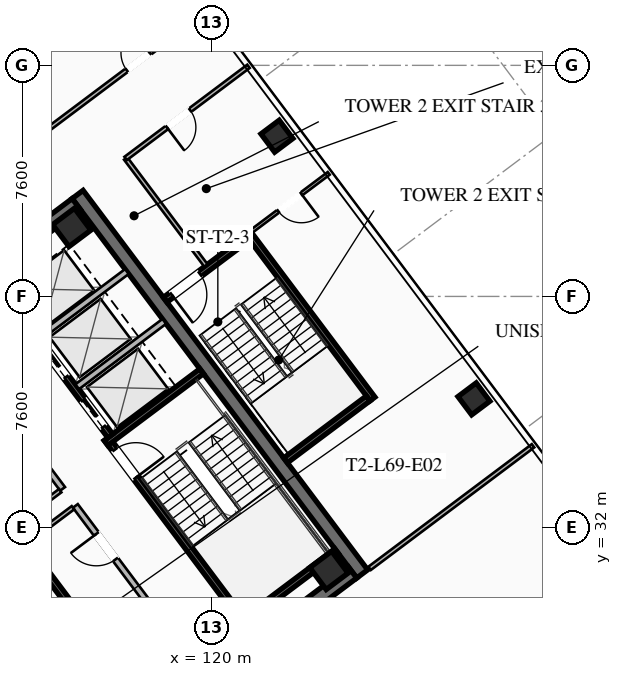
"""IFC4 building model, lengths in metres.
Left out: names, types, materials, properties, quantities, classifications, styles, units other than length and angle.
Written with IfcOpenShell. Run it as: python <this file> out.ifc"""

import sys

from ifc_helpers import new_model, si_unit, direction, frame, frame_2d, origin, origin_2d, place, context, subcontext, project, spatial, rectangle, hollow_rectangle, extrude, element, fill, save


model = new_model("IFC4")
c1 = context("Model", 3, precision=1e-05, world=origin(), true_north=direction((0.0, 1.0)))
c2 = subcontext(c1, "Body", "Model", "MODEL_VIEW")
j1 = project(units=[si_unit("LENGTHUNIT", "METRE"), si_unit("PLANEANGLEUNIT", "RADIAN")], contexts=[c1])
p1 = place(None, origin())
s1 = spatial("IfcSite", under=j1, at=p1, CompositionType="ELEMENT")
p2 = place(p1, origin())
s2 = spatial("IfcBuilding", under=s1, at=p2, CompositionType="ELEMENT")
p3 = place(p2, frame((0.0, 0.0, 255.4)))
s3 = spatial("IfcBuildingStorey", under=s2, at=p3, CompositionType="ELEMENT", Elevation=255.4)
p4 = place(p3, frame((115.604, 42.953, 0.0), z_axis=(0.0, 0.0, 1.0), x_axis=(0.600005007985, -0.799996243986, 0.0)))
e1 = element("IfcWall", 1, at=p4, inside=s3, PredefinedType="SHEAR", context=c2, shape_type="SweptSolid", body=[
    extrude(rectangle(XDim=15.6, YDim=0.45, at=frame_2d((7.8, 0.0))), origin(), (0.0, 0.0, 1.0), 4.0),
])
p5 = place(p3, frame((124.649, 30.518, 0.0), z_axis=(0.0, 0.0, 1.0), x_axis=(-0.8, -0.6, 0.0)))
e2 = element("IfcWall", 2, at=p5, inside=s3, PredefinedType="SHEAR", context=c2, shape_type="SweptSolid", body=[
    extrude(rectangle(XDim=15.26, YDim=0.45, at=frame_2d((7.63, 0.0))), origin(), (0.0, 0.0, 1.0), 4.0),
])
p6 = place(p5, frame((9.33, 0.0, 0.0)))
e3 = element("IfcOpeningElement", 3, at=p6, cuts=e2, PredefinedType="OPENING", context=c2, shape_type="SweptSolid", body=[
    extrude(rectangle(XDim=1.25, YDim=2.25, at=frame_2d((0.625, 1.125))), frame((0.0, 0.235, 0.0), z_axis=(0.0, -1.0, 0.0), x_axis=(1.0, 0.0, 0.0)), (0.0, 0.0, 1.0), 0.47),
])
p7 = place(p5, frame((4.28, 0.0, 0.0)))
e4 = element("IfcOpeningElement", 4, at=p7, cuts=e2, PredefinedType="OPENING", context=c2, shape_type="SweptSolid", body=[
    extrude(rectangle(XDim=1.25, YDim=2.25, at=frame_2d((0.625, 1.125))), frame((0.0, 0.235, 0.0), z_axis=(0.0, -1.0, 0.0), x_axis=(1.0, 0.0, 0.0)), (0.0, 0.0, 1.0), 0.47),
])
p8 = place(p3, frame((103.351, 33.482, 0.0), z_axis=(0.0, 0.0, 1.0), x_axis=(0.8, 0.6, 0.0)))
e5 = element("IfcWall", 5, at=p8, inside=s3, PredefinedType="SHEAR", context=c2, shape_type="SweptSolid", body=[
    extrude(rectangle(XDim=15.26, YDim=0.45, at=frame_2d((7.63, 0.0))), origin(), (0.0, 0.0, 1.0), 4.0),
])
p9 = place(p8, frame((4.68, 0.0, 0.0)))
e6 = element("IfcOpeningElement", 6, at=p9, cuts=e5, PredefinedType="OPENING", context=c2, shape_type="SweptSolid", body=[
    extrude(rectangle(XDim=1.25, YDim=2.25, at=frame_2d((0.625, 1.125))), frame((0.0, 0.235, 0.0), z_axis=(0.0, -1.0, 0.0), x_axis=(1.0, 0.0, 0.0)), (0.0, 0.0, 1.0), 0.47),
])
p10 = place(p8, frame((9.73, 0.0, 0.0)))
e7 = element("IfcOpeningElement", 7, at=p10, cuts=e5, PredefinedType="OPENING", context=c2, shape_type="SweptSolid", body=[
    extrude(rectangle(XDim=1.25, YDim=2.25, at=frame_2d((0.625, 1.125))), frame((0.0, 0.235, 0.0), z_axis=(0.0, -1.0, 0.0), x_axis=(1.0, 0.0, 0.0)), (0.0, 0.0, 1.0), 0.47),
])
for number, where, z_axis, x_axis in (
    (8, (123.87, 30.59, 0.0), (0.0, 0.0, 1.0), (0.8, 0.6, 0.0)),
    (9, (115.41, 41.87, 0.0), (0.0, 0.0, 1.0), (0.8, 0.6, 0.0)),
):
    element("IfcColumn", number, at=place(p3, frame(where, z_axis=z_axis, x_axis=x_axis)), inside=s3, PredefinedType="COLUMN", context=c2, shape_type="SweptSolid", body=[
        extrude(hollow_rectangle(XDim=0.9, YDim=0.9, WallThickness=0.04, at=origin_2d()), origin(), (0.0, 0.0, 1.0), 3.78),
    ])
for number, where, z_axis, x_axis in (
    (10, (128.64, 36.23, 0.0), (0.0, 0.0, 1.0), (0.8, 0.6, 0.0)),
    (11, (122.16, 44.87, 0.0), (0.0, 0.0, 1.0), (0.8, 0.6, 0.0)),
):
    element("IfcColumn", number, at=place(p3, frame(where, z_axis=z_axis, x_axis=x_axis)), inside=s3, PredefinedType="COLUMN", context=c2, shape_type="SweptSolid", body=[
        extrude(hollow_rectangle(XDim=0.75, YDim=0.75, WallThickness=0.032, at=origin_2d()), origin(), (0.0, 0.0, 1.0), 3.78),
    ])
p11 = place(p3, frame((116.56, 34.92, 0.0), z_axis=(0.0, 0.0, 1.0), x_axis=(0.59999041401, -0.800007189403, 0.0)))
e12 = element("IfcWall", 12, at=p11, inside=s3, PredefinedType="SHEAR", context=c2, shape_type="SweptSolid", body=[
    extrude(rectangle(XDim=8.15, YDim=0.2, at=frame_2d((4.075, 0.0))), origin(), (0.0, 0.0, 1.0), 3.78),
])
p12 = place(p11, frame((0.45, 0.0, 0.0)))
e13 = element("IfcOpeningElement", 13, at=p12, cuts=e12, PredefinedType="OPENING", context=c2, shape_type="SweptSolid", body=[
    extrude(rectangle(XDim=1.15, YDim=2.2, at=frame_2d((0.575, 1.1))), frame((0.0, 0.11, 0.0), z_axis=(0.0, -1.0, 0.0), x_axis=(1.0, 0.0, 0.0)), (0.0, 0.0, 1.0), 0.22),
])
for number, where, z_axis, x_axis in (
    (14, (116.54, 34.78, 0.0), (0.0, 0.0, 1.0), (0.8, 0.6, 0.0)),
    (15, (120.98, 28.86, 0.0), (0.0, 0.0, 1.0), (0.8, 0.6, 0.0)),
):
    element("IfcWall", number, at=place(p3, frame(where, z_axis=z_axis, x_axis=x_axis)), inside=s3, PredefinedType="SHEAR", context=c2, shape_type="SweptSolid", body=[
        extrude(rectangle(XDim=3.93, YDim=0.2, at=frame_2d((1.965, 0.0))), origin(), (0.0, 0.0, 1.0), 3.78),
    ])
p13 = place(p3, frame((118.058, 25.856, 0.0), z_axis=(0.0, 0.0, 1.0), x_axis=(-0.600002657301, 0.799998007018, 0.0)))
e16 = element("IfcWall", 16, at=p13, inside=s3, PredefinedType="SHEAR", context=c2, shape_type="SweptSolid", body=[
    extrude(rectangle(XDim=14.7, YDim=0.2, at=frame_2d((7.35, 0.0))), origin(), (0.0, 0.0, 1.0), 3.78),
])
p14 = place(p3, frame((112.75, 40.25, 0.0), z_axis=(0.0, 0.0, 1.0), x_axis=(0.599994036198, -0.800004472816, 0.0)))
e17 = element("IfcWall", 17, at=p14, inside=s3, PredefinedType="SHEAR", context=c2, shape_type="SweptSolid", body=[
    extrude(rectangle(XDim=6.55, YDim=0.2, at=frame_2d((3.275, 0.0))), origin(), (0.0, 0.0, 1.0), 3.78),
])
p15 = place(p14, frame((5.075, 0.0, 0.0)))
e18 = element("IfcOpeningElement", 18, at=p15, cuts=e17, PredefinedType="OPENING", context=c2, shape_type="SweptSolid", body=[
    extrude(rectangle(XDim=1.1, YDim=2.2, at=frame_2d((0.55, 1.1))), frame((0.0, 0.11, 0.0), z_axis=(0.0, -1.0, 0.0), x_axis=(1.0, 0.0, 0.0)), (0.0, 0.0, 1.0), 0.22),
])
p16 = place(p14, frame((3.025, 0.0, 0.0)))
e19 = element("IfcOpeningElement", 19, at=p16, cuts=e17, PredefinedType="OPENING", context=c2, shape_type="SweptSolid", body=[
    extrude(rectangle(XDim=1.1, YDim=2.2, at=frame_2d((0.55, 1.1))), frame((0.0, 0.11, 0.0), z_axis=(0.0, -1.0, 0.0), x_axis=(1.0, 0.0, 0.0)), (0.0, 0.0, 1.0), 0.22),
])
p17 = place(p14, frame((1.025, 0.0, 0.0)))
e20 = element("IfcOpeningElement", 20, at=p17, cuts=e17, PredefinedType="OPENING", context=c2, shape_type="SweptSolid", body=[
    extrude(rectangle(XDim=1.1, YDim=2.2, at=frame_2d((0.55, 1.1))), frame((0.0, 0.11, 0.0), z_axis=(0.0, -1.0, 0.0), x_axis=(1.0, 0.0, 0.0)), (0.0, 0.0, 1.0), 0.22),
])
for number, where, z_axis, x_axis in (
    (21, (115.59, 36.63, 0.0), (0.0, 0.0, 1.0), (0.8, 0.6, 0.0)),
    (22, (114.36, 38.27, 0.0), (0.0, 0.0, 1.0), (0.8, 0.6, 0.0)),
):
    element("IfcWall", number, at=place(p3, frame(where, z_axis=z_axis, x_axis=x_axis)), inside=s3, PredefinedType="SOLIDWALL", context=c2, shape_type="SweptSolid", body=[
        extrude(rectangle(XDim=3.58, YDim=0.2, at=frame_2d((1.79, 0.0))), origin(), (0.0, 0.0, 1.0), 3.78),
    ])
p18 = place(p3, frame((119.73, 27.11, 0.0), z_axis=(0.0, 0.0, 1.0), x_axis=(-0.600005580459, 0.799995814625, 0.0)))
e23 = element("IfcWall", 23, at=p18, inside=s3, PredefinedType="SOLIDWALL", context=c2, shape_type="SweptSolid", body=[
    extrude(rectangle(XDim=7.0, YDim=0.2, at=frame_2d((3.5, 0.0))), origin(), (0.0, 0.0, 1.0), 2.971),
])
p19 = place(p18, frame((0.85, 0.0, 0.0)))
e24 = element("IfcOpeningElement", 24, at=p19, cuts=e23, PredefinedType="OPENING", context=c2, shape_type="SweptSolid", body=[
    extrude(rectangle(XDim=0.95, YDim=2.05, at=frame_2d((0.475, 1.025))), frame((0.0, 0.11, 0.0), z_axis=(0.0, -1.0, 0.0), x_axis=(1.0, 0.0, 0.0)), (0.0, 0.0, 1.0), 0.22),
])
p20 = place(p18, frame((4.8, 0.0, 0.0)))
e25 = element("IfcOpeningElement", 25, at=p20, cuts=e23, PredefinedType="OPENING", context=c2, shape_type="SweptSolid", body=[
    extrude(rectangle(XDim=1.05, YDim=2.2, at=frame_2d((0.525, 1.1))), frame((0.0, 0.11, 0.0), z_axis=(0.0, -1.0, 0.0), x_axis=(1.0, 0.0, 0.0)), (0.0, 0.0, 1.0), 0.22),
])
p21 = place(p3, frame((113.946, 31.522, 0.0), z_axis=(0.0, 0.0, 1.0), x_axis=(0.8, 0.6, 0.0)))
e26 = element("IfcWall", 26, at=p21, inside=s3, PredefinedType="PARTITIONING", context=c2, shape_type="SweptSolid", body=[
    extrude(rectangle(XDim=1.88, YDim=0.135, at=frame_2d((0.94, 0.0))), origin(), (0.0, 0.0, 1.0), 2.971),
])
p22 = place(p3, frame((115.11, 33.27, 0.0), z_axis=(0.0, 0.0, 1.0), x_axis=(-0.600011160345, 0.79999162962, 0.0)))
e27 = element("IfcWall", 27, at=p22, inside=s3, PredefinedType="SOLIDWALL", context=c2, shape_type="SweptSolid", body=[
    extrude(rectangle(XDim=7.0, YDim=0.2, at=frame_2d((3.5, 0.0))), origin(), (0.0, 0.0, 1.0), 2.971),
])
p23 = place(p22, frame((0.85, 0.0, 0.0)))
e28 = element("IfcOpeningElement", 28, at=p23, cuts=e27, PredefinedType="OPENING", context=c2, shape_type="SweptSolid", body=[
    extrude(rectangle(XDim=0.95, YDim=2.05, at=frame_2d((0.475, 1.025))), frame((0.0, 0.11, 0.0), z_axis=(0.0, -1.0, 0.0), x_axis=(1.0, 0.0, 0.0)), (0.0, 0.0, 1.0), 0.22),
])
p24 = place(p22, frame((4.85, 0.0, 0.0)))
e29 = element("IfcOpeningElement", 29, at=p24, cuts=e27, PredefinedType="OPENING", context=c2, shape_type="SweptSolid", body=[
    extrude(rectangle(XDim=0.95, YDim=2.05, at=frame_2d((0.475, 1.025))), frame((0.0, 0.11, 0.0), z_axis=(0.0, -1.0, 0.0), x_axis=(1.0, 0.0, 0.0)), (0.0, 0.0, 1.0), 0.22),
])
p25 = place(p3, frame((113.526, 32.082, 0.0), z_axis=(0.0, 0.0, 1.0), x_axis=(0.800046745961, 0.599937666993, 0.0)))
e30 = element("IfcWall", 30, at=p25, inside=s3, PredefinedType="PARTITIONING", context=c2, shape_type="SweptSolid", body=[
    extrude(rectangle(XDim=1.88, YDim=0.135, at=frame_2d((0.94, 0.0))), origin(), (0.0, 0.0, 1.0), 2.971),
])
p26 = place(p3, frame((125.304, 36.228, 0.0), z_axis=(0.0, 0.0, 1.0), x_axis=(-0.59998851072, 0.800008616831, 0.0)))
e31 = element("IfcWall", 31, at=p26, inside=s3, PredefinedType="SHEAR", context=c2, shape_type="SweptSolid", body=[
    extrude(rectangle(XDim=6.8, YDim=0.2, at=frame_2d((3.4, 0.0))), origin(), (0.0, 0.0, 1.0), 3.78),
])
p27 = place(p3, frame((121.204, 41.528, 0.0), z_axis=(0.0, 0.0, 1.0), x_axis=(-0.800017232136, -0.599977023131, 0.0)))
e32 = element("IfcWall", 32, at=p27, inside=s3, PredefinedType="SHEAR", context=c2, shape_type="SweptSolid", body=[
    extrude(rectangle(XDim=3.4, YDim=0.2, at=frame_2d((1.7, 0.0))), origin(), (0.0, 0.0, 1.0), 3.78),
])
p28 = place(p27, frame((1.975, 0.0, 0.0)))
e33 = element("IfcOpeningElement", 33, at=p28, cuts=e32, PredefinedType="OPENING", context=c2, shape_type="SweptSolid", body=[
    extrude(rectangle(XDim=1.15, YDim=2.2, at=frame_2d((0.575, 1.1))), frame((0.0, 0.11, 0.0), z_axis=(0.0, -1.0, 0.0), x_axis=(1.0, 0.0, 0.0)), (0.0, 0.0, 1.0), 0.22),
])
p29 = place(p3, frame((122.444, 34.208, 0.0), z_axis=(0.0, 0.0, 1.0), x_axis=(0.79999138319, 0.600011488909, 0.0)))
e34 = element("IfcWall", 34, at=p29, inside=s3, PredefinedType="SHEAR", context=c2, shape_type="SweptSolid", body=[
    extrude(rectangle(XDim=3.4, YDim=0.2, at=frame_2d((1.7, 0.0))), origin(), (0.0, 0.0, 1.0), 3.78),
])
p30 = place(p3, frame((119.824, 40.618, 0.0), z_axis=(0.0, 0.0, 1.0), x_axis=(-0.599982243973, 0.800013316712, 0.0)))
e35 = element("IfcWall", 35, at=p30, inside=s3, PredefinedType="PARTITIONING", context=c2, shape_type="SweptSolid", body=[
    extrude(rectangle(XDim=4.4, YDim=0.135, at=frame_2d((2.2, 0.0))), origin(), (0.0, 0.0, 1.0), 2.971),
])
p31 = place(p3, frame((100.236, 34.302, 0.0), z_axis=(0.0, 0.0, 1.0), x_axis=(0.799997393501, 0.600003475316, 0.0)))
e36 = element("IfcWall", 36, at=p31, inside=s3, PredefinedType="PARTITIONING", context=c2, shape_type="SweptSolid", body=[
    extrude(rectangle(XDim=22.48, YDim=0.135, at=frame_2d((11.24, 0.0))), origin(), (0.0, 0.0, 1.0), 2.971),
])
p32 = place(p31, frame((0.3, 0.0, 0.0)))
e37 = element("IfcOpeningElement", 37, at=p32, cuts=e36, PredefinedType="OPENING", context=c2, shape_type="SweptSolid", body=[
    extrude(rectangle(XDim=0.95, YDim=2.05, at=frame_2d((0.475, 1.025))), frame((0.0, 0.077, 0.0), z_axis=(0.0, -1.0, 0.0), x_axis=(1.0, 0.0, 0.0)), (0.0, 0.0, 1.0), 0.155),
])
p33 = place(p31, frame((21.23, 0.0, 0.0)))
e38 = element("IfcOpeningElement", 38, at=p33, cuts=e36, PredefinedType="OPENING", context=c2, shape_type="SweptSolid", body=[
    extrude(rectangle(XDim=0.95, YDim=2.05, at=frame_2d((0.475, 1.025))), frame((0.0, 0.077, 0.0), z_axis=(0.0, -1.0, 0.0), x_axis=(1.0, 0.0, 0.0)), (0.0, 0.0, 1.0), 0.155),
])
p34 = place(p3, frame((121.224, 47.168, 0.0), z_axis=(0.0, 0.0, 1.0), x_axis=(-0.8, -0.6, 0.0)))
e39 = element("IfcWall", 39, at=p34, inside=s3, PredefinedType="PARTITIONING", context=c2, shape_type="SweptSolid", body=[
    extrude(rectangle(XDim=5.05, YDim=0.135, at=frame_2d((2.525, 0.0))), origin(), (0.0, 0.0, 1.0), 2.971),
])
p35 = place(p34, frame((2.4, 0.0, 0.0)))
e40 = element("IfcOpeningElement", 40, at=p35, cuts=e39, PredefinedType="OPENING", context=c2, shape_type="SweptSolid", body=[
    extrude(rectangle(XDim=0.95, YDim=2.05, at=frame_2d((0.475, 1.025))), frame((0.0, 0.077, 0.0), z_axis=(0.0, -1.0, 0.0), x_axis=(1.0, 0.0, 0.0)), (0.0, 0.0, 1.0), 0.155),
])
p36 = place(p3, frame((125.208, 30.656, 0.0), z_axis=(0.0, 0.0, 1.0), x_axis=(0.8, 0.6, 0.0)))
e41 = element("IfcWall", 41, at=p36, inside=s3, PredefinedType="PARTITIONING", context=c2, shape_type="SweptSolid", body=[
    extrude(rectangle(XDim=6.72, YDim=0.135, at=frame_2d((3.36, 0.0))), origin(), (0.0, 0.0, 1.0), 2.971),
])
p37 = place(p3, frame((123.864, 43.648, 0.0), z_axis=(0.0, 0.0, 1.0), x_axis=(-0.800018310174, -0.599975585658, 0.0)))
e42 = element("IfcWall", 42, at=p37, inside=s3, PredefinedType="PARTITIONING", context=c2, shape_type="SweptSolid", body=[
    extrude(rectangle(XDim=3.2, YDim=0.11, at=frame_2d((1.6, 0.0))), origin(), (0.0, 0.0, 1.0), 2.971),
])
p38 = place(p37, frame((1.125, 0.0, 0.0)))
e43 = element("IfcOpeningElement", 43, at=p38, cuts=e42, PredefinedType="OPENING", context=c2, shape_type="SweptSolid", body=[
    extrude(rectangle(XDim=0.95, YDim=2.05, at=frame_2d((0.475, 1.025))), frame((0.0, 0.065, 0.0), z_axis=(0.0, -1.0, 0.0), x_axis=(1.0, 0.0, 0.0)), (0.0, 0.0, 1.0), 0.13),
])
p39 = place(p12, origin())
e44 = element("IfcDoor", 44, at=p39, inside=s3, OperationType="SINGLE_SWING_RIGHT", PredefinedType="DOOR", context=c2, shape_type="SweptSolid", body=[
    extrude(rectangle(XDim=1.15, YDim=2.2, at=frame_2d((0.575, 1.1))), frame((0.0, 0.025, 0.0), z_axis=(0.0, -1.0, 0.0), x_axis=(1.0, 0.0, 0.0)), (0.0, 0.0, 1.0), 0.05),
])
fill(e13, e44)
p40 = place(p20, origin())
e45 = element("IfcDoor", 45, at=p40, inside=s3, OperationType="SINGLE_SWING_RIGHT", PredefinedType="DOOR", context=c2, shape_type="SweptSolid", body=[
    extrude(rectangle(XDim=1.05, YDim=2.2, at=frame_2d((0.525, 1.1))), frame((0.0, 0.025, 0.0), z_axis=(0.0, -1.0, 0.0), x_axis=(1.0, 0.0, 0.0)), (0.0, 0.0, 1.0), 0.05),
])
fill(e25, e45)
p41 = place(p28, origin())
e46 = element("IfcDoor", 46, at=p41, inside=s3, OperationType="SINGLE_SWING_RIGHT", PredefinedType="DOOR", context=c2, shape_type="SweptSolid", body=[
    extrude(rectangle(XDim=1.15, YDim=2.2, at=frame_2d((0.575, 1.1))), frame((0.0, 0.025, 0.0), z_axis=(0.0, -1.0, 0.0), x_axis=(1.0, 0.0, 0.0)), (0.0, 0.0, 1.0), 0.05),
])
fill(e33, e46)
p42 = place(p33, origin())
e47 = element("IfcDoor", 47, at=p42, inside=s3, OperationType="SINGLE_SWING_RIGHT", PredefinedType="DOOR", context=c2, shape_type="SweptSolid", body=[
    extrude(rectangle(XDim=0.95, YDim=2.05, at=frame_2d((0.475, 1.025))), frame((0.0, 0.025, 0.0), z_axis=(0.0, -1.0, 0.0), x_axis=(1.0, 0.0, 0.0)), (0.0, 0.0, 1.0), 0.05),
])
fill(e38, e47)
p43 = place(p35, origin())
e48 = element("IfcDoor", 48, at=p43, inside=s3, OperationType="SINGLE_SWING_RIGHT", PredefinedType="DOOR", context=c2, shape_type="SweptSolid", body=[
    extrude(rectangle(XDim=0.95, YDim=2.05, at=frame_2d((0.475, 1.025))), frame((0.0, 0.025, 0.0), z_axis=(0.0, -1.0, 0.0), x_axis=(1.0, 0.0, 0.0)), (0.0, 0.0, 1.0), 0.05),
])
fill(e40, e48)
p44 = place(p38, origin())
e49 = element("IfcDoor", 49, at=p44, inside=s3, OperationType="SINGLE_SWING_LEFT", PredefinedType="DOOR", context=c2, shape_type="SweptSolid", body=[
    extrude(rectangle(XDim=0.95, YDim=2.05, at=frame_2d((0.475, 1.025))), frame((0.0, 0.025, 0.0), z_axis=(0.0, -1.0, 0.0), x_axis=(1.0, 0.0, 0.0)), (0.0, 0.0, 1.0), 0.05),
])
fill(e43, e49)
p45 = place(p15, origin())
e50 = element("IfcDoor", 50, at=p45, inside=s3, OperationType="SLIDING_TO_LEFT", PredefinedType="DOOR", context=c2, shape_type="SweptSolid", body=[
    extrude(rectangle(XDim=1.1, YDim=2.2, at=frame_2d((0.55, 1.1))), frame((0.0, 0.025, 0.0), z_axis=(0.0, -1.0, 0.0), x_axis=(1.0, 0.0, 0.0)), (0.0, 0.0, 1.0), 0.05),
])
fill(e18, e50)
p46 = place(p16, origin())
e51 = element("IfcDoor", 51, at=p46, inside=s3, OperationType="SLIDING_TO_LEFT", PredefinedType="DOOR", context=c2, shape_type="SweptSolid", body=[
    extrude(rectangle(XDim=1.1, YDim=2.2, at=frame_2d((0.55, 1.1))), frame((0.0, 0.025, 0.0), z_axis=(0.0, -1.0, 0.0), x_axis=(1.0, 0.0, 0.0)), (0.0, 0.0, 1.0), 0.05),
])
fill(e19, e51)
save(model, sys.argv[1])
